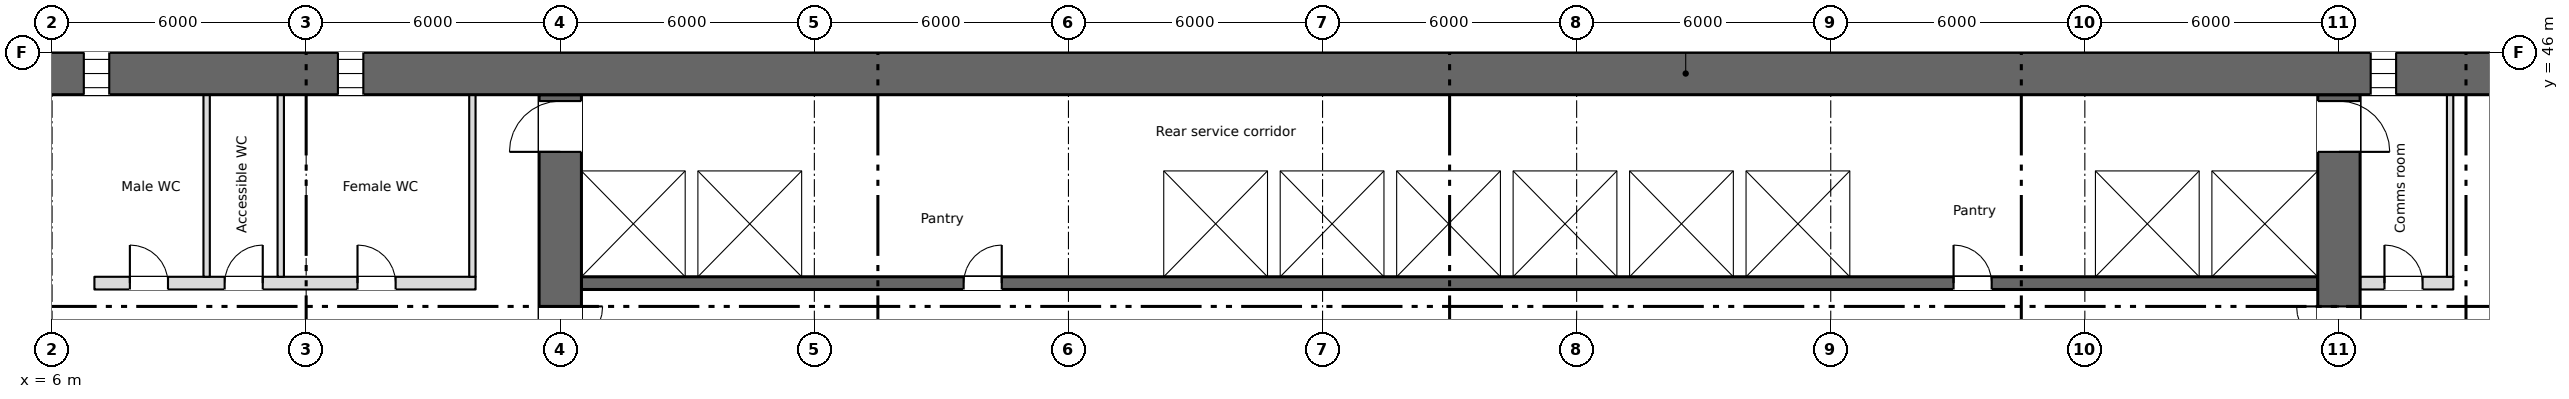
"""IFC4 building model, lengths in metres.
Left out: names, types, materials, properties, quantities, classifications, styles, units other than length and angle.
Written with IfcOpenShell. Run it as: python <this file> out.ifc"""

import sys

from ifc_helpers import new_model, si_unit, direction, frame, frame_2d, origin, place, context, subcontext, project, spatial, rectangle, extrude, element, fill, save


model = new_model("IFC4")
c1 = context("Model", 3, precision=1e-05, world=origin(), true_north=direction((0.0, 1.0)))
c2 = subcontext(c1, "Body", "Model", "MODEL_VIEW")
j1 = project(units=[si_unit("LENGTHUNIT", "METRE"), si_unit("PLANEANGLEUNIT", "RADIAN")], contexts=[c1])
p1 = place(None, origin())
s1 = spatial("IfcSite", under=j1, at=p1, CompositionType="ELEMENT")
p2 = place(p1, origin())
s2 = spatial("IfcBuilding", under=s1, at=p2, CompositionType="ELEMENT")
p3 = place(p2, frame((0.0, 0.0, 45.0)))
s3 = spatial("IfcBuildingStorey", under=s2, at=p3, CompositionType="ELEMENT", Elevation=45.0)
p4 = place(p3, frame((5.55, 45.5, 0.0), z_axis=(0.0, 0.0, 1.0), x_axis=(1.0, 0.0, 0.0)))
e1 = element("IfcWall", 1, at=p4, inside=s3, PredefinedType="SHEAR", context=c2, shape_type="SweptSolid", body=[
    extrude(rectangle(XDim=66.9, YDim=1.0, at=frame_2d((33.45, 0.0))), origin(), (0.0, 0.0, 1.0), 3.35),
])
p5 = place(p4, frame((1.2, 0.0, 0.6)))
e2 = element("IfcOpeningElement", 2, at=p5, cuts=e1, PredefinedType="OPENING", context=c2, shape_type="SweptSolid", body=[
    extrude(rectangle(XDim=0.6, YDim=2.4, at=frame_2d((0.3, 1.2))), frame((0.0, 0.51, 0.0), z_axis=(0.0, -1.0, 0.0), x_axis=(1.0, 0.0, 0.0)), (0.0, 0.0, 1.0), 1.02),
])
p6 = place(p4, frame((7.2, 0.0, 0.6)))
e3 = element("IfcOpeningElement", 3, at=p6, cuts=e1, PredefinedType="OPENING", context=c2, shape_type="SweptSolid", body=[
    extrude(rectangle(XDim=0.6, YDim=2.4, at=frame_2d((0.3, 1.2))), frame((0.0, 0.51, 0.0), z_axis=(0.0, -1.0, 0.0), x_axis=(1.0, 0.0, 0.0)), (0.0, 0.0, 1.0), 1.02),
])
p7 = place(p4, frame((55.2, 0.0, 0.6)))
e4 = element("IfcOpeningElement", 4, at=p7, cuts=e1, PredefinedType="OPENING", context=c2, shape_type="SweptSolid", body=[
    extrude(rectangle(XDim=0.6, YDim=2.4, at=frame_2d((0.3, 1.2))), frame((0.0, 0.51, 0.0), z_axis=(0.0, -1.0, 0.0), x_axis=(1.0, 0.0, 0.0)), (0.0, 0.0, 1.0), 1.02),
])
p8 = place(p4, frame((61.2, 0.0, 0.6)))
e5 = element("IfcOpeningElement", 5, at=p8, cuts=e1, PredefinedType="OPENING", context=c2, shape_type="SweptSolid", body=[
    extrude(rectangle(XDim=0.6, YDim=2.4, at=frame_2d((0.3, 1.2))), frame((0.0, 0.51, 0.0), z_axis=(0.0, -1.0, 0.0), x_axis=(1.0, 0.0, 0.0)), (0.0, 0.0, 1.0), 1.02),
])
p9 = place(p3, frame((6.85, 28.4, 0.0), z_axis=(0.0, 0.0, 1.0), x_axis=(0.0, 1.0, 0.0)))
e6 = element("IfcWall", 6, at=p9, inside=s3, PredefinedType="SHEAR", context=c2, shape_type="SweptSolid", body=[
    extrude(rectangle(XDim=16.6, YDim=0.3, at=frame_2d((8.3, 0.0))), origin(), (0.0, 0.0, 1.0), 3.35),
])
p10 = place(p3, frame((18.0, 28.4, 0.0), z_axis=(0.0, 0.0, 1.0), x_axis=(0.0, 1.0, 0.0)))
e7 = element("IfcWall", 7, at=p10, inside=s3, PredefinedType="SHEAR", context=c2, shape_type="SweptSolid", body=[
    extrude(rectangle(XDim=16.6, YDim=1.0, at=frame_2d((8.3, 0.0))), origin(), (0.0, 0.0, 1.0), 3.35),
])
p11 = place(p10, frame((9.6, 0.0, 0.0)))
e8 = element("IfcOpeningElement", 8, at=p11, cuts=e7, PredefinedType="OPENING", context=c2, shape_type="SweptSolid", body=[
    extrude(rectangle(XDim=2.0, YDim=2.1, at=frame_2d((1.0, 1.05))), frame((0.0, 0.51, 0.0), z_axis=(0.0, -1.0, 0.0), x_axis=(1.0, 0.0, 0.0)), (0.0, 0.0, 1.0), 1.02),
])
p12 = place(p10, frame((15.25, 0.0, 0.0)))
e9 = element("IfcOpeningElement", 9, at=p12, cuts=e7, PredefinedType="OPENING", context=c2, shape_type="SweptSolid", body=[
    extrude(rectangle(XDim=1.2, YDim=2.1, at=frame_2d((0.6, 1.05))), frame((0.0, 0.51, 0.0), z_axis=(0.0, -1.0, 0.0), x_axis=(1.0, 0.0, 0.0)), (0.0, 0.0, 1.0), 1.02),
])
p13 = place(p3, frame((60.0, 28.4, 0.0), z_axis=(0.0, 0.0, 1.0), x_axis=(0.0, 1.0, 0.0)))
e10 = element("IfcWall", 10, at=p13, inside=s3, PredefinedType="SHEAR", context=c2, shape_type="SweptSolid", body=[
    extrude(rectangle(XDim=16.6, YDim=1.0, at=frame_2d((8.3, 0.0))), origin(), (0.0, 0.0, 1.0), 3.35),
])
p14 = place(p13, frame((9.6, 0.0, 0.0)))
e11 = element("IfcOpeningElement", 11, at=p14, cuts=e10, PredefinedType="OPENING", context=c2, shape_type="SweptSolid", body=[
    extrude(rectangle(XDim=2.0, YDim=2.1, at=frame_2d((1.0, 1.05))), frame((0.0, 0.51, 0.0), z_axis=(0.0, -1.0, 0.0), x_axis=(1.0, 0.0, 0.0)), (0.0, 0.0, 1.0), 1.02),
])
p15 = place(p13, frame((15.25, 0.0, 0.0)))
e12 = element("IfcOpeningElement", 12, at=p15, cuts=e10, PredefinedType="OPENING", context=c2, shape_type="SweptSolid", body=[
    extrude(rectangle(XDim=1.2, YDim=2.1, at=frame_2d((0.6, 1.05))), frame((0.0, 0.51, 0.0), z_axis=(0.0, -1.0, 0.0), x_axis=(1.0, 0.0, 0.0)), (0.0, 0.0, 1.0), 1.02),
])
p16 = place(p3, frame((18.5, 40.55, 0.0), z_axis=(0.0, 0.0, 1.0), x_axis=(1.0, 0.0, 0.0)))
e13 = element("IfcWall", 13, at=p16, inside=s3, PredefinedType="SHEAR", context=c2, shape_type="SweptSolid", body=[
    extrude(rectangle(XDim=41.0, YDim=0.3, at=frame_2d((20.5, 0.0))), origin(), (0.0, 0.0, 1.0), 3.35),
])
p17 = place(p16, frame((9.025, 0.0, 0.0)))
e14 = element("IfcOpeningElement", 14, at=p17, cuts=e13, PredefinedType="OPENING", context=c2, shape_type="SweptSolid", body=[
    extrude(rectangle(XDim=0.9, YDim=2.1, at=frame_2d((0.45, 1.05))), frame((0.0, 0.16, 0.0), z_axis=(0.0, -1.0, 0.0), x_axis=(1.0, 0.0, 0.0)), (0.0, 0.0, 1.0), 0.32),
])
p18 = place(p16, frame((32.4, 0.0, 0.0)))
e15 = element("IfcOpeningElement", 15, at=p18, cuts=e13, PredefinedType="OPENING", context=c2, shape_type="SweptSolid", body=[
    extrude(rectangle(XDim=0.9, YDim=2.1, at=frame_2d((0.45, 1.05))), frame((0.0, 0.16, 0.0), z_axis=(0.0, -1.0, 0.0), x_axis=(1.0, 0.0, 0.0)), (0.0, 0.0, 1.0), 0.32),
])
p19 = place(p16, frame((14.425, 0.0, 0.0)))
e16 = element("IfcOpeningElement", 16, at=p19, cuts=e13, PredefinedType="OPENING", context=c2, shape_type="SweptSolid", body=[
    extrude(rectangle(XDim=1.1, YDim=2.1, at=frame_2d((0.55, 1.05))), frame((0.0, 0.16, 0.0), z_axis=(0.0, -1.0, 0.0), x_axis=(1.0, 0.0, 0.0)), (0.0, 0.0, 1.0), 0.32),
])
p20 = place(p16, frame((17.175, 0.0, 0.0)))
e17 = element("IfcOpeningElement", 17, at=p20, cuts=e13, PredefinedType="OPENING", context=c2, shape_type="SweptSolid", body=[
    extrude(rectangle(XDim=1.1, YDim=2.1, at=frame_2d((0.55, 1.05))), frame((0.0, 0.16, 0.0), z_axis=(0.0, -1.0, 0.0), x_axis=(1.0, 0.0, 0.0)), (0.0, 0.0, 1.0), 0.32),
])
p21 = place(p16, frame((19.925, 0.0, 0.0)))
e18 = element("IfcOpeningElement", 18, at=p21, cuts=e13, PredefinedType="OPENING", context=c2, shape_type="SweptSolid", body=[
    extrude(rectangle(XDim=1.1, YDim=2.1, at=frame_2d((0.55, 1.05))), frame((0.0, 0.16, 0.0), z_axis=(0.0, -1.0, 0.0), x_axis=(1.0, 0.0, 0.0)), (0.0, 0.0, 1.0), 0.32),
])
p22 = place(p16, frame((22.675, 0.0, 0.0)))
e19 = element("IfcOpeningElement", 19, at=p22, cuts=e13, PredefinedType="OPENING", context=c2, shape_type="SweptSolid", body=[
    extrude(rectangle(XDim=1.1, YDim=2.1, at=frame_2d((0.55, 1.05))), frame((0.0, 0.16, 0.0), z_axis=(0.0, -1.0, 0.0), x_axis=(1.0, 0.0, 0.0)), (0.0, 0.0, 1.0), 0.32),
])
p23 = place(p16, frame((36.375, 0.0, 0.0)))
e20 = element("IfcOpeningElement", 20, at=p23, cuts=e13, PredefinedType="OPENING", context=c2, shape_type="SweptSolid", body=[
    extrude(rectangle(XDim=1.2, YDim=2.1, at=frame_2d((0.6, 1.05))), frame((0.0, 0.16, 0.0), z_axis=(0.0, -1.0, 0.0), x_axis=(1.0, 0.0, 0.0)), (0.0, 0.0, 1.0), 0.32),
])
p24 = place(p16, frame((39.15, 0.0, 0.0)))
e21 = element("IfcOpeningElement", 21, at=p24, cuts=e13, PredefinedType="OPENING", context=c2, shape_type="SweptSolid", body=[
    extrude(rectangle(XDim=1.2, YDim=2.1, at=frame_2d((0.6, 1.05))), frame((0.0, 0.16, 0.0), z_axis=(0.0, -1.0, 0.0), x_axis=(1.0, 0.0, 0.0)), (0.0, 0.0, 1.0), 0.32),
])
p25 = place(p3, frame((18.5, 43.35, 0.0), z_axis=(0.0, 0.0, 1.0), x_axis=(1.0, 0.0, 0.0)))
e22 = element("IfcWall", 22, at=p25, inside=s3, PredefinedType="SHEAR", context=c2, shape_type="SweptSolid", body=[
    extrude(rectangle(XDim=41.0, YDim=0.3, at=frame_2d((20.5, 0.0))), origin(), (0.0, 0.0, 1.0), 3.35),
])
p26 = place(p3, frame((7.0, 40.55, 0.0), z_axis=(0.0, 0.0, 1.0), x_axis=(1.0, 0.0, 0.0)))
e23 = element("IfcWall", 23, at=p26, inside=s3, PredefinedType="PARTITIONING", context=c2, shape_type="SweptSolid", body=[
    extrude(rectangle(XDim=9.0, YDim=0.3, at=frame_2d((4.5, 0.0))), origin(), (0.0, 0.0, 1.0), 3.35),
])
p27 = place(p26, frame((0.837, 0.0, 0.0)))
e24 = element("IfcOpeningElement", 24, at=p27, cuts=e23, PredefinedType="OPENING", context=c2, shape_type="SweptSolid", body=[
    extrude(rectangle(XDim=0.9, YDim=2.1, at=frame_2d((0.45, 1.05))), frame((0.0, 0.16, 0.0), z_axis=(0.0, -1.0, 0.0), x_axis=(1.0, 0.0, 0.0)), (0.0, 0.0, 1.0), 0.32),
])
p28 = place(p26, frame((3.075, 0.0, 0.0)))
e25 = element("IfcOpeningElement", 25, at=p28, cuts=e23, PredefinedType="OPENING", context=c2, shape_type="SweptSolid", body=[
    extrude(rectangle(XDim=0.9, YDim=2.1, at=frame_2d((0.45, 1.05))), frame((0.0, 0.16, 0.0), z_axis=(0.0, -1.0, 0.0), x_axis=(1.0, 0.0, 0.0)), (0.0, 0.0, 1.0), 0.32),
])
p29 = place(p26, frame((6.212, 0.0, 0.0)))
e26 = element("IfcOpeningElement", 26, at=p29, cuts=e23, PredefinedType="OPENING", context=c2, shape_type="SweptSolid", body=[
    extrude(rectangle(XDim=0.9, YDim=2.1, at=frame_2d((0.45, 1.05))), frame((0.0, 0.16, 0.0), z_axis=(0.0, -1.0, 0.0), x_axis=(1.0, 0.0, 0.0)), (0.0, 0.0, 1.0), 0.32),
])
p30 = place(p3, frame((60.5, 40.55, 0.0), z_axis=(0.0, 0.0, 1.0), x_axis=(1.0, 0.0, 0.0)))
e27 = element("IfcWall", 27, at=p30, inside=s3, PredefinedType="PARTITIONING", context=c2, shape_type="SweptSolid", body=[
    extrude(rectangle(XDim=2.2, YDim=0.3, at=frame_2d((1.1, 0.0))), origin(), (0.0, 0.0, 1.0), 3.35),
])
p31 = place(p30, frame((0.575, 0.0, 0.0)))
e28 = element("IfcOpeningElement", 28, at=p31, cuts=e27, PredefinedType="OPENING", context=c2, shape_type="SweptSolid", body=[
    extrude(rectangle(XDim=0.9, YDim=2.1, at=frame_2d((0.45, 1.05))), frame((0.0, 0.16, 0.0), z_axis=(0.0, -1.0, 0.0), x_axis=(1.0, 0.0, 0.0)), (0.0, 0.0, 1.0), 0.32),
])
for number, where, z_axis, x_axis in (
    (29, (21.1, 40.7, 0.0), (0.0, 0.0, 1.0), (0.0, 1.0, 0.0)),
    (30, (23.85, 40.7, 0.0), (0.0, 0.0, 1.0), (0.0, 1.0, 0.0)),
    (31, (32.1, 40.7, 0.0), (0.0, 0.0, 1.0), (0.0, 1.0, 0.0)),
    (32, (34.85, 40.7, 0.0), (0.0, 0.0, 1.0), (0.0, 1.0, 0.0)),
    (33, (37.6, 40.7, 0.0), (0.0, 0.0, 1.0), (0.0, 1.0, 0.0)),
    (34, (40.35, 40.7, 0.0), (0.0, 0.0, 1.0), (0.0, 1.0, 0.0)),
    (35, (43.1, 40.7, 0.0), (0.0, 0.0, 1.0), (0.0, 1.0, 0.0)),
    (36, (45.85, 40.7, 0.0), (0.0, 0.0, 1.0), (0.0, 1.0, 0.0)),
    (37, (48.6, 40.7, 0.0), (0.0, 0.0, 1.0), (0.0, 1.0, 0.0)),
    (38, (54.1, 40.7, 0.0), (0.0, 0.0, 1.0), (0.0, 1.0, 0.0)),
    (39, (56.85, 40.7, 0.0), (0.0, 0.0, 1.0), (0.0, 1.0, 0.0)),
):
    element("IfcWall", number, at=place(p3, frame(where, z_axis=z_axis, x_axis=x_axis)), inside=s3, PredefinedType="SHEAR", context=c2, shape_type="SweptSolid", body=[
        extrude(rectangle(XDim=2.5, YDim=0.3, at=frame_2d((1.25, 0.0))), origin(), (0.0, 0.0, 1.0), 3.35),
    ])
for number, where, z_axis, x_axis in (
    (40, (15.925, 40.7, 0.0), (0.0, 0.0, 1.0), (0.0, 1.0, 0.0)),
    (41, (62.625, 40.7, 0.0), (0.0, 0.0, 1.0), (0.0, 1.0, 0.0)),
    (42, (9.65, 40.7, 0.0), (0.0, 0.0, 1.0), (0.0, 1.0, 0.0)),
    (43, (11.4, 40.7, 0.0), (0.0, 0.0, 1.0), (0.0, 1.0, 0.0)),
):
    element("IfcWall", number, at=place(p3, frame(where, z_axis=z_axis, x_axis=x_axis)), inside=s3, PredefinedType="PARTITIONING", context=c2, shape_type="SweptSolid", body=[
        extrude(rectangle(XDim=4.3, YDim=0.15, at=frame_2d((2.15, 0.0))), origin(), (0.0, 0.0, 1.0), 3.35),
    ])
p32 = place(p5, origin())
e44 = element("IfcWindow", 44, at=p32, inside=s3, PartitioningType="SINGLE_PANEL", PredefinedType="WINDOW", context=c2, shape_type="SweptSolid", body=[
    extrude(rectangle(XDim=0.6, YDim=2.4, at=frame_2d((0.3, 1.2))), frame((0.0, 0.03, 0.0), z_axis=(0.0, -1.0, 0.0), x_axis=(1.0, 0.0, 0.0)), (0.0, 0.0, 1.0), 0.06),
])
fill(e2, e44)
p33 = place(p6, origin())
e45 = element("IfcWindow", 45, at=p33, inside=s3, PartitioningType="SINGLE_PANEL", PredefinedType="WINDOW", context=c2, shape_type="SweptSolid", body=[
    extrude(rectangle(XDim=0.6, YDim=2.4, at=frame_2d((0.3, 1.2))), frame((0.0, 0.03, 0.0), z_axis=(0.0, -1.0, 0.0), x_axis=(1.0, 0.0, 0.0)), (0.0, 0.0, 1.0), 0.06),
])
fill(e3, e45)
p34 = place(p7, origin())
e46 = element("IfcWindow", 46, at=p34, inside=s3, PartitioningType="SINGLE_PANEL", PredefinedType="WINDOW", context=c2, shape_type="SweptSolid", body=[
    extrude(rectangle(XDim=0.6, YDim=2.4, at=frame_2d((0.3, 1.2))), frame((0.0, 0.03, 0.0), z_axis=(0.0, -1.0, 0.0), x_axis=(1.0, 0.0, 0.0)), (0.0, 0.0, 1.0), 0.06),
])
fill(e4, e46)
p35 = place(p27, origin())
e47 = element("IfcDoor", 47, at=p35, inside=s3, OperationType="SINGLE_SWING_LEFT", PredefinedType="DOOR", context=c2, shape_type="SweptSolid", body=[
    extrude(rectangle(XDim=0.9, YDim=2.1, at=frame_2d((0.45, 1.05))), frame((0.0, 0.025, 0.0), z_axis=(0.0, -1.0, 0.0), x_axis=(1.0, 0.0, 0.0)), (0.0, 0.0, 1.0), 0.05),
])
fill(e24, e47)
p36 = place(p28, origin())
e48 = element("IfcDoor", 48, at=p36, inside=s3, OperationType="SINGLE_SWING_RIGHT", PredefinedType="DOOR", context=c2, shape_type="SweptSolid", body=[
    extrude(rectangle(XDim=0.9, YDim=2.1, at=frame_2d((0.45, 1.05))), frame((0.0, 0.025, 0.0), z_axis=(0.0, -1.0, 0.0), x_axis=(1.0, 0.0, 0.0)), (0.0, 0.0, 1.0), 0.05),
])
fill(e25, e48)
p37 = place(p29, origin())
e49 = element("IfcDoor", 49, at=p37, inside=s3, OperationType="SINGLE_SWING_LEFT", PredefinedType="DOOR", context=c2, shape_type="SweptSolid", body=[
    extrude(rectangle(XDim=0.9, YDim=2.1, at=frame_2d((0.45, 1.05))), frame((0.0, 0.025, 0.0), z_axis=(0.0, -1.0, 0.0), x_axis=(1.0, 0.0, 0.0)), (0.0, 0.0, 1.0), 0.05),
])
fill(e26, e49)
p38 = place(p31, origin())
e50 = element("IfcDoor", 50, at=p38, inside=s3, OperationType="SINGLE_SWING_LEFT", PredefinedType="DOOR", context=c2, shape_type="SweptSolid", body=[
    extrude(rectangle(XDim=0.9, YDim=2.1, at=frame_2d((0.45, 1.05))), frame((0.0, 0.025, 0.0), z_axis=(0.0, -1.0, 0.0), x_axis=(1.0, 0.0, 0.0)), (0.0, 0.0, 1.0), 0.05),
])
fill(e28, e50)
p39 = place(p17, origin())
e51 = element("IfcDoor", 51, at=p39, inside=s3, OperationType="SINGLE_SWING_RIGHT", PredefinedType="DOOR", context=c2, shape_type="SweptSolid", body=[
    extrude(rectangle(XDim=0.9, YDim=2.1, at=frame_2d((0.45, 1.05))), frame((0.0, 0.025, 0.0), z_axis=(0.0, -1.0, 0.0), x_axis=(1.0, 0.0, 0.0)), (0.0, 0.0, 1.0), 0.05),
])
fill(e14, e51)
p40 = place(p18, origin())
e52 = element("IfcDoor", 52, at=p40, inside=s3, OperationType="SINGLE_SWING_LEFT", PredefinedType="DOOR", context=c2, shape_type="SweptSolid", body=[
    extrude(rectangle(XDim=0.9, YDim=2.1, at=frame_2d((0.45, 1.05))), frame((0.0, 0.025, 0.0), z_axis=(0.0, -1.0, 0.0), x_axis=(1.0, 0.0, 0.0)), (0.0, 0.0, 1.0), 0.05),
])
fill(e15, e52)
p41 = place(p19, origin())
e53 = element("IfcDoor", 53, at=p41, inside=s3, OperationType="SLIDING_TO_LEFT", PredefinedType="DOOR", context=c2, shape_type="SweptSolid", body=[
    extrude(rectangle(XDim=1.1, YDim=2.1, at=frame_2d((0.55, 1.05))), frame((0.0, 0.025, 0.0), z_axis=(0.0, -1.0, 0.0), x_axis=(1.0, 0.0, 0.0)), (0.0, 0.0, 1.0), 0.05),
])
fill(e16, e53)
p42 = place(p20, origin())
e54 = element("IfcDoor", 54, at=p42, inside=s3, OperationType="SLIDING_TO_LEFT", PredefinedType="DOOR", context=c2, shape_type="SweptSolid", body=[
    extrude(rectangle(XDim=1.1, YDim=2.1, at=frame_2d((0.55, 1.05))), frame((0.0, 0.025, 0.0), z_axis=(0.0, -1.0, 0.0), x_axis=(1.0, 0.0, 0.0)), (0.0, 0.0, 1.0), 0.05),
])
fill(e17, e54)
p43 = place(p21, origin())
e55 = element("IfcDoor", 55, at=p43, inside=s3, OperationType="SLIDING_TO_LEFT", PredefinedType="DOOR", context=c2, shape_type="SweptSolid", body=[
    extrude(rectangle(XDim=1.1, YDim=2.1, at=frame_2d((0.55, 1.05))), frame((0.0, 0.025, 0.0), z_axis=(0.0, -1.0, 0.0), x_axis=(1.0, 0.0, 0.0)), (0.0, 0.0, 1.0), 0.05),
])
fill(e18, e55)
p44 = place(p22, origin())
e56 = element("IfcDoor", 56, at=p44, inside=s3, OperationType="SLIDING_TO_LEFT", PredefinedType="DOOR", context=c2, shape_type="SweptSolid", body=[
    extrude(rectangle(XDim=1.1, YDim=2.1, at=frame_2d((0.55, 1.05))), frame((0.0, 0.025, 0.0), z_axis=(0.0, -1.0, 0.0), x_axis=(1.0, 0.0, 0.0)), (0.0, 0.0, 1.0), 0.05),
])
fill(e19, e56)
p45 = place(p23, origin())
e57 = element("IfcDoor", 57, at=p45, inside=s3, OperationType="SLIDING_TO_LEFT", PredefinedType="DOOR", context=c2, shape_type="SweptSolid", body=[
    extrude(rectangle(XDim=1.2, YDim=2.1, at=frame_2d((0.6, 1.05))), frame((0.0, 0.025, 0.0), z_axis=(0.0, -1.0, 0.0), x_axis=(1.0, 0.0, 0.0)), (0.0, 0.0, 1.0), 0.05),
])
fill(e20, e57)
p46 = place(p24, origin())
e58 = element("IfcDoor", 58, at=p46, inside=s3, OperationType="SLIDING_TO_LEFT", PredefinedType="DOOR", context=c2, shape_type="SweptSolid", body=[
    extrude(rectangle(XDim=1.2, YDim=2.1, at=frame_2d((0.6, 1.05))), frame((0.0, 0.025, 0.0), z_axis=(0.0, -1.0, 0.0), x_axis=(1.0, 0.0, 0.0)), (0.0, 0.0, 1.0), 0.05),
])
fill(e21, e58)
p47 = place(p11, origin())
e59 = element("IfcDoor", 59, at=p47, inside=s3, OperationType="DOUBLE_DOOR_SINGLE_SWING", PredefinedType="DOOR", context=c2, shape_type="SweptSolid", body=[
    extrude(rectangle(XDim=2.0, YDim=2.1, at=frame_2d((1.0, 1.05))), frame((0.0, 0.025, 0.0), z_axis=(0.0, -1.0, 0.0), x_axis=(1.0, 0.0, 0.0)), (0.0, 0.0, 1.0), 0.05),
])
fill(e8, e59)
p48 = place(p14, origin())
e60 = element("IfcDoor", 60, at=p48, inside=s3, OperationType="DOUBLE_DOOR_SINGLE_SWING", PredefinedType="DOOR", context=c2, shape_type="SweptSolid", body=[
    extrude(rectangle(XDim=2.0, YDim=2.1, at=frame_2d((1.0, 1.05))), frame((0.0, 0.025, 0.0), z_axis=(0.0, -1.0, 0.0), x_axis=(1.0, 0.0, 0.0)), (0.0, 0.0, 1.0), 0.05),
])
fill(e11, e60)
p49 = place(p12, origin())
e61 = element("IfcDoor", 61, at=p49, inside=s3, OperationType="SINGLE_SWING_LEFT", PredefinedType="DOOR", context=c2, shape_type="SweptSolid", body=[
    extrude(rectangle(XDim=1.2, YDim=2.1, at=frame_2d((0.6, 1.05))), frame((0.0, 0.025, 0.0), z_axis=(0.0, -1.0, 0.0), x_axis=(1.0, 0.0, 0.0)), (0.0, 0.0, 1.0), 0.05),
])
fill(e9, e61)
p50 = place(p15, origin())
e62 = element("IfcDoor", 62, at=p50, inside=s3, OperationType="SINGLE_SWING_LEFT", PredefinedType="DOOR", context=c2, shape_type="SweptSolid", body=[
    extrude(rectangle(XDim=1.2, YDim=2.1, at=frame_2d((0.6, 1.05))), frame((0.0, 0.025, 0.0), z_axis=(0.0, -1.0, 0.0), x_axis=(1.0, 0.0, 0.0)), (0.0, 0.0, 1.0), 0.05),
])
fill(e12, e62)
save(model, sys.argv[1])
